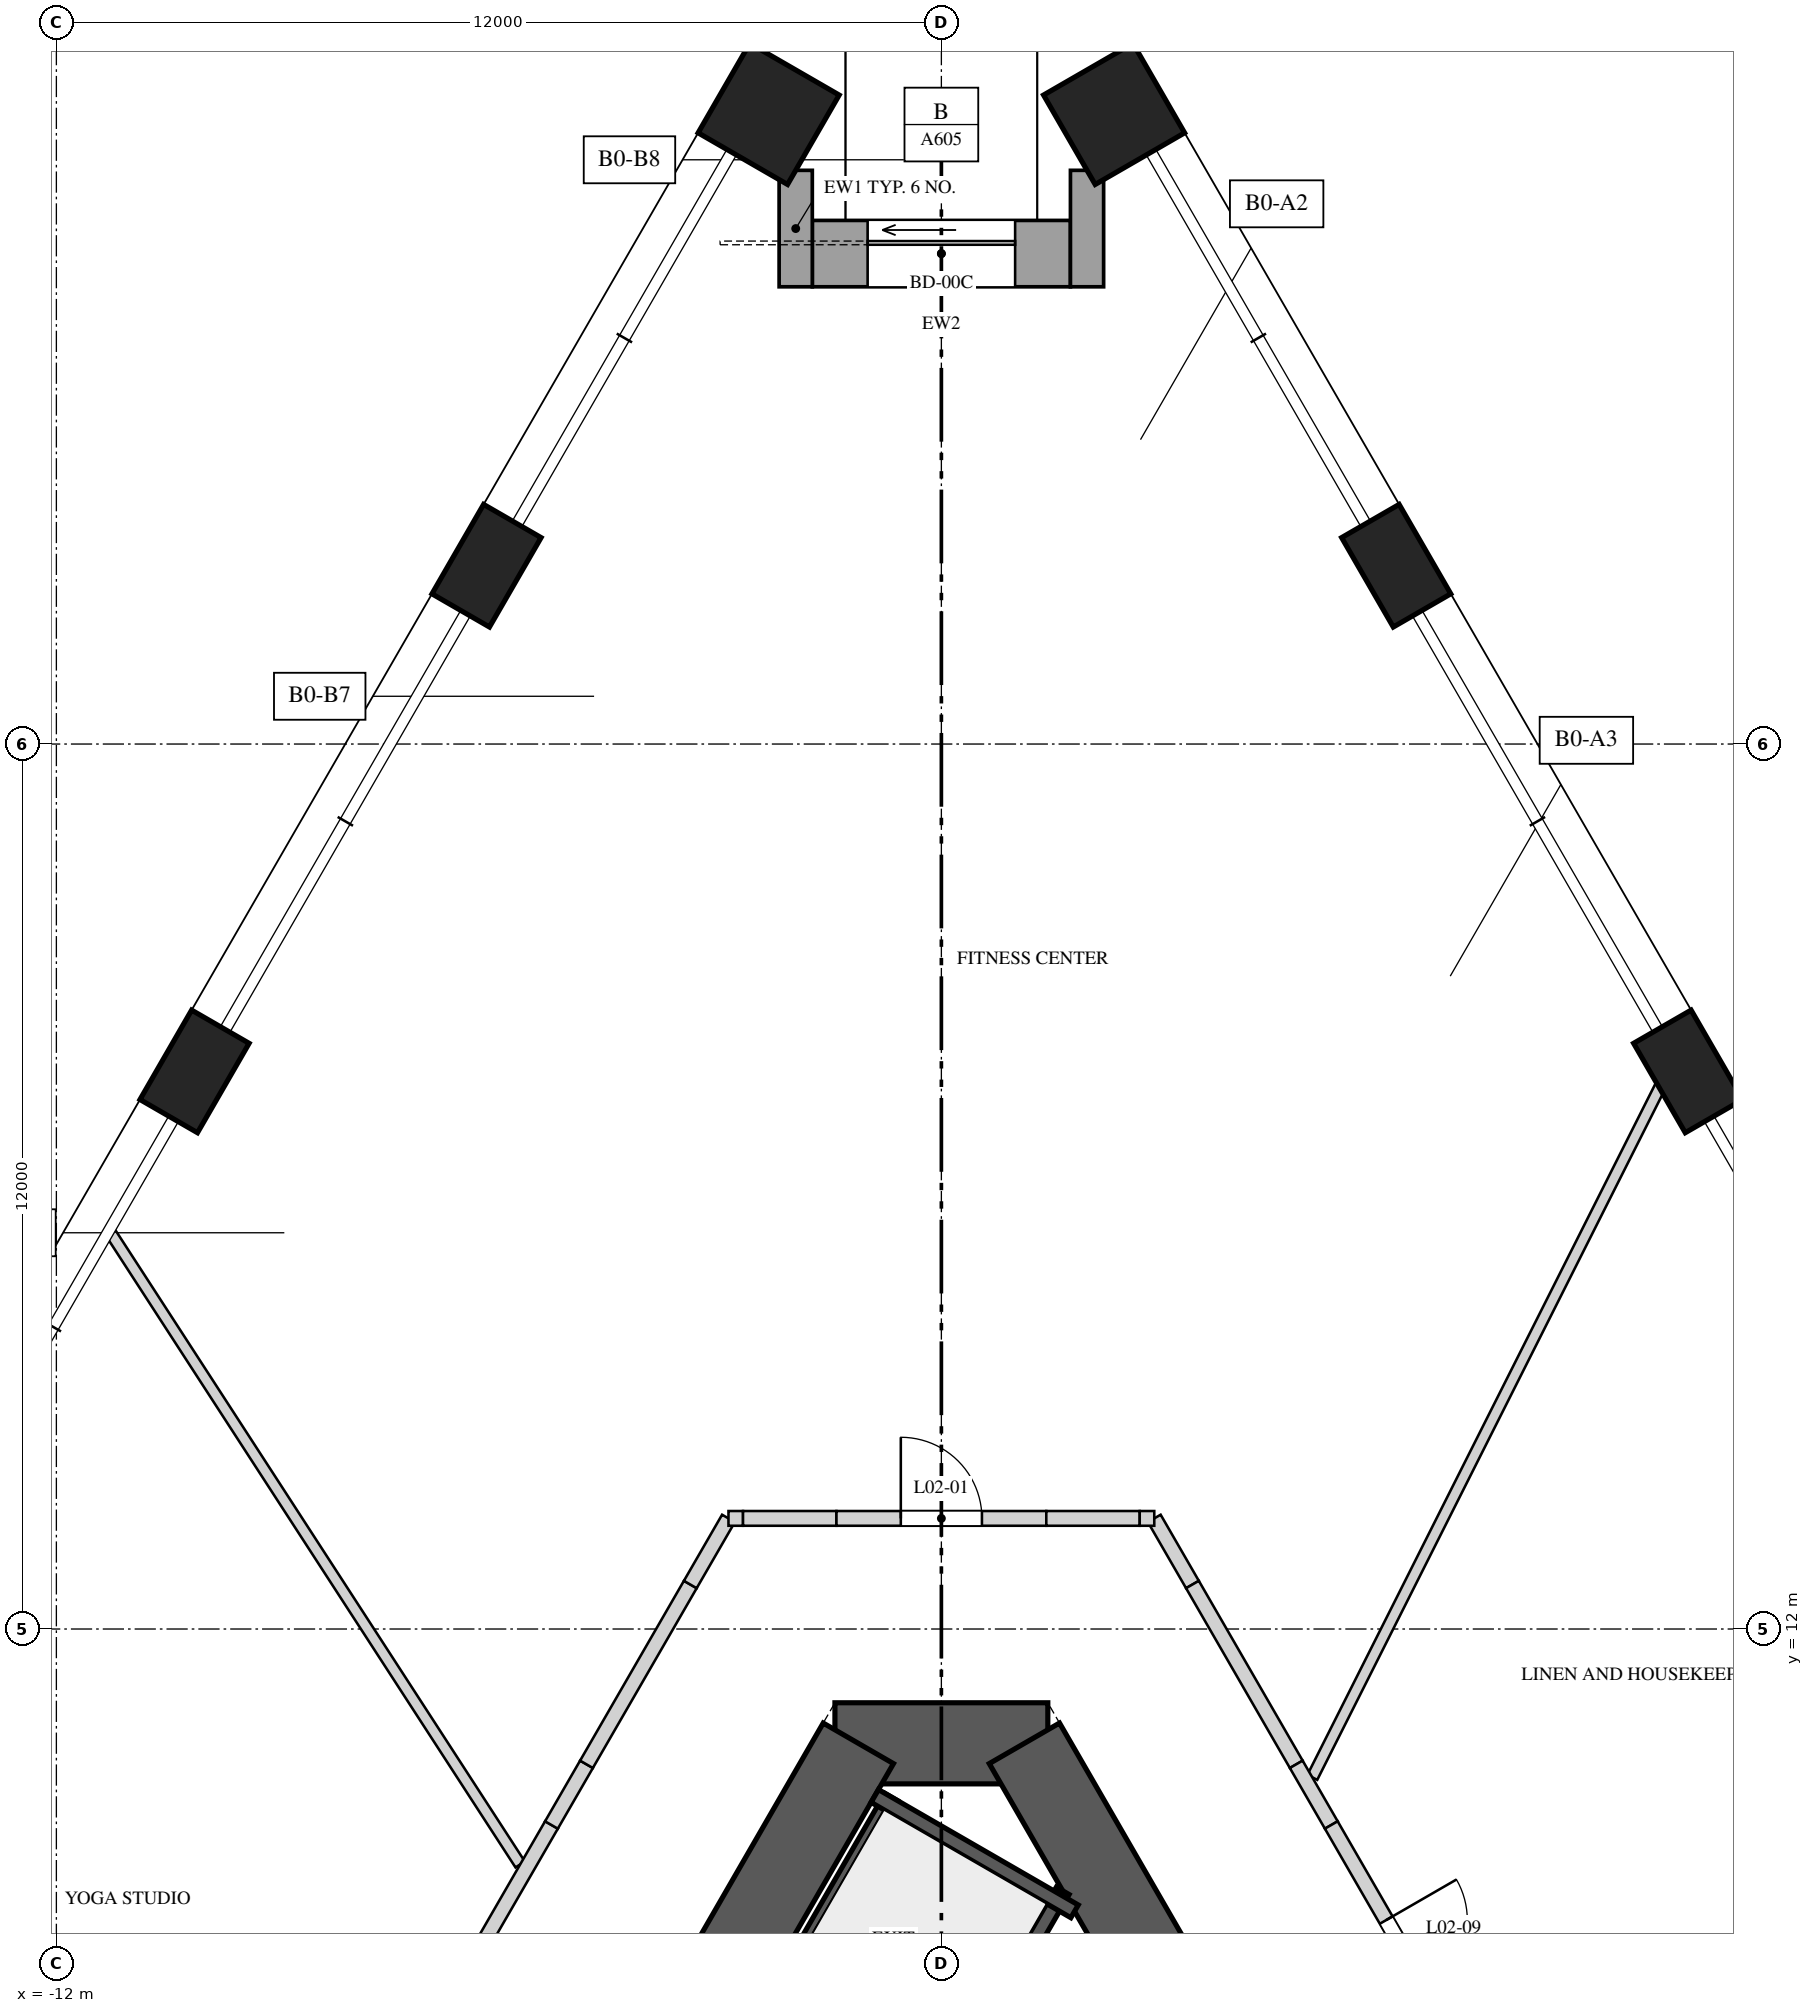
"""IFC4 building model, lengths in metres.
Left out: names, types, materials, properties, quantities, classifications, styles, units other than length and angle.
Written with IfcOpenShell. Run it as: python <this file> out.ifc"""

import sys

from ifc_helpers import new_model, si_unit, direction, frame, frame_2d, origin, origin_2d, place, context, subcontext, project, spatial, polyline, rectangle, outline, extrude, element, fill, save


model = new_model("IFC4")
c1 = context("Model", 3, precision=1e-05, world=origin(), true_north=direction((0.0, 1.0)))
c2 = subcontext(c1, "Body", "Model", "MODEL_VIEW")
j1 = project(units=[si_unit("LENGTHUNIT", "METRE"), si_unit("PLANEANGLEUNIT", "RADIAN")], contexts=[c1])
p1 = place(None, origin())
s1 = spatial("IfcSite", under=j1, at=p1, CompositionType="ELEMENT")
p2 = place(p1, origin())
s2 = spatial("IfcBuilding", under=s1, at=p2, CompositionType="ELEMENT")
p3 = place(p2, frame((0.0, 0.0, 15.0)))
s3 = spatial("IfcBuildingStorey", under=s2, at=p3, CompositionType="ELEMENT", Elevation=15.0)
p4 = place(p3, frame((1.443, 10.45, 0.0), z_axis=(0.0, 0.0, 1.0), x_axis=(-1.0, 0.0, 0.0)))
e1 = element("IfcWall", 1, at=p4, inside=s3, PredefinedType="SHEAR", context=c2, shape_type="SweptSolid", body=[
    extrude(rectangle(XDim=2.887, YDim=1.1, at=frame_2d((1.443, 0.0))), origin(), (0.0, 0.0, 1.0), 5.0),
])
p5 = place(p3, frame((-1.126, 10.45, 0.0), z_axis=(0.0, 0.0, 1.0), x_axis=(-0.500001757713, -0.866024388966, 0.0)))
e2 = element("IfcWall", 2, at=p5, inside=s3, PredefinedType="SHEAR", context=c2, shape_type="SweptSolid", body=[
    extrude(rectangle(XDim=16.974, YDim=1.1, at=frame_2d((8.487, 0.0))), origin(), (0.0, 0.0, 1.0), 5.0),
])
p6 = place(p5, frame((6.692, 0.0, 0.0)))
e3 = element("IfcOpeningElement", 3, at=p6, cuts=e2, PredefinedType="OPENING", context=c2, shape_type="SweptSolid", body=[
    extrude(rectangle(XDim=1.0, YDim=2.4, at=frame_2d((0.5, 1.2))), frame((0.0, 0.56, 0.0), z_axis=(0.0, -1.0, 0.0), x_axis=(1.0, 0.0, 0.0)), (0.0, 0.0, 1.0), 1.12),
])
p7 = place(p5, frame((14.397, 0.0, 0.0)))
e4 = element("IfcOpeningElement", 4, at=p7, cuts=e2, PredefinedType="OPENING", context=c2, shape_type="SweptSolid", body=[
    extrude(rectangle(XDim=0.8, YDim=2.1, at=frame_2d((0.4, 1.05))), frame((0.0, 0.56, 0.0), z_axis=(0.0, -1.0, 0.0), x_axis=(1.0, 0.0, 0.0)), (0.0, 0.0, 1.0), 1.12),
])
p8 = place(p3, frame((9.613, -4.25, 0.0), z_axis=(0.0, 0.0, 1.0), x_axis=(-0.500001757713, 0.866024388966, 0.0)))
e5 = element("IfcWall", 5, at=p8, inside=s3, PredefinedType="SHEAR", context=c2, shape_type="SweptSolid", body=[
    extrude(rectangle(XDim=16.974, YDim=1.1, at=frame_2d((8.487, 0.0))), origin(), (0.0, 0.0, 1.0), 5.0),
])
p9 = place(p8, frame((6.762, 0.0, 0.0)))
e6 = element("IfcOpeningElement", 6, at=p9, cuts=e5, PredefinedType="OPENING", context=c2, shape_type="SweptSolid", body=[
    extrude(rectangle(XDim=1.0, YDim=2.4, at=frame_2d((0.5, 1.2))), frame((0.0, 0.56, 0.0), z_axis=(0.0, -1.0, 0.0), x_axis=(1.0, 0.0, 0.0)), (0.0, 0.0, 1.0), 1.12),
])
p10 = place(p3, frame((-2.342, 32.544, 0.0), z_axis=(0.0, 0.0, 1.0), x_axis=(-0.5, -0.866025403784, 0.0)))
e7 = element("IfcColumn", 7, at=p10, inside=s3, PredefinedType="COLUMN", context=c2, shape_type="SweptSolid", body=[
    extrude(rectangle(XDim=1.4, YDim=1.4, at=origin_2d()), origin(), (0.0, 0.0, 1.0), 5.0),
])
for number, where, z_axis, x_axis in (
    (8, (-6.167, 26.418, 0.0), (0.0, 0.0, 1.0), (-0.5, -0.866, 0.0)),
    (9, (-10.126, 19.561, 0.0), (0.0, 0.0, 1.0), (-0.5, -0.866, 0.0)),
    (10, (10.126, 19.561, 0.0), (0.0, 0.0, 1.0), (-0.5, 0.866, 0.0)),
    (11, (6.167, 26.418, 0.0), (0.0, 0.0, 1.0), (-0.5, 0.866, 0.0)),
):
    element("IfcColumn", number, at=place(p3, frame(where, z_axis=z_axis, x_axis=x_axis)), inside=s3, PredefinedType="COLUMN", context=c2, shape_type="SweptSolid", body=[
        extrude(rectangle(XDim=1.4, YDim=0.9, at=origin_2d()), origin(), (0.0, 0.0, 1.0), 5.0),
    ])
p11 = place(p3, frame((2.342, 32.544, 0.0), z_axis=(0.0, 0.0, 1.0), x_axis=(-0.5, 0.866025403784, 0.0)))
e12 = element("IfcColumn", 12, at=p11, inside=s3, PredefinedType="COLUMN", context=c2, shape_type="SweptSolid", body=[
    extrude(rectangle(XDim=1.4, YDim=1.4, at=origin_2d()), origin(), (0.0, 0.0, 1.0), 5.0),
])
p12 = place(p3, frame((-1.75, 30.65, 0.0), z_axis=(0.0, 0.0, 1.0), x_axis=(1.0, 0.0, 0.0)))
e13 = element("IfcWall", 13, at=p12, inside=s3, PredefinedType="SOLIDWALL", context=c2, shape_type="SweptSolid", body=[
    extrude(rectangle(XDim=3.5, YDim=0.9, at=frame_2d((1.75, 0.0))), origin(), (0.0, 0.0, 1.0), 4.3),
])
p13 = place(p12, frame((0.75, 0.0, 0.0)))
e14 = element("IfcOpeningElement", 14, at=p13, cuts=e13, PredefinedType="OPENING", context=c2, shape_type="SweptSolid", body=[
    extrude(rectangle(XDim=2.0, YDim=2.4, at=frame_2d((1.0, 1.2))), frame((0.0, 0.46, 0.0), z_axis=(0.0, -1.0, 0.0), x_axis=(1.0, 0.0, 0.0)), (0.0, 0.0, 1.0), 0.92),
])
for number, where, z_axis, x_axis in (
    (15, (-1.975, 31.779, 0.0), (0.0, 0.0, 1.0), (0.0, -1.0, 0.0)),
    (16, (1.975, 31.779, 0.0), (0.0, 0.0, 1.0), (0.0, -1.0, 0.0)),
):
    element("IfcWall", number, at=place(p3, frame(where, z_axis=z_axis, x_axis=x_axis)), inside=s3, PredefinedType="SOLIDWALL", context=c2, shape_type="SweptSolid", body=[
        extrude(rectangle(XDim=1.579, YDim=0.45, at=frame_2d((0.79, 0.0))), origin(), (0.0, 0.0, 1.0), 2.55),
    ])
p14 = place(p3, frame((-0.68, 9.722, 0.0), z_axis=(0.0, 0.0, 1.0), x_axis=(-0.49998037582, -0.866036733513, 0.0)))
e17 = element("IfcWall", 17, at=p14, inside=s3, PredefinedType="SOLIDWALL", context=c2, shape_type="SweptSolid", body=[
    extrude(rectangle(XDim=6.2, YDim=0.2, at=frame_2d((3.1, 0.0))), origin(), (0.0, 0.0, 1.0), 4.65),
])
p15 = place(p3, frame((1.646, 8.45, 0.0), z_axis=(0.0, 0.0, 1.0), x_axis=(-0.500006002103, -0.866021938441, 0.0)))
e18 = element("IfcWall", 18, at=p15, inside=s3, PredefinedType="SOLIDWALL", context=c2, shape_type="SweptSolid", body=[
    extrude(rectangle(XDim=6.261, YDim=0.2, at=frame_2d((3.13, 0.0))), origin(), (0.0, 0.0, 1.0), 4.65),
])
p16 = place(p3, frame((1.806, 8.172, 0.0), z_axis=(0.0, 0.0, 1.0), x_axis=(-0.866054327916, 0.499949898588, 0.0)))
e19 = element("IfcWall", 19, at=p16, inside=s3, PredefinedType="SOLIDWALL", context=c2, shape_type="SweptSolid", body=[
    extrude(rectangle(XDim=3.128, YDim=0.2, at=frame_2d((1.564, 0.0))), origin(), (0.0, 0.0, 1.0), 4.65),
])
p17 = place(p3, frame((-5.711, 8.808, 0.0), z_axis=(0.0, 0.0, 1.0), x_axis=(-0.544077203012, 0.839035158478, 0.0)))
e20 = element("IfcWall", 20, at=p17, inside=s3, PredefinedType="PARTITIONING", context=c2, shape_type="SweptSolid", body=[
    extrude(rectangle(XDim=10.194, YDim=0.15, at=frame_2d((5.097, 0.0))), origin(), (0.0, 0.0, 1.0), 4.65),
])
p18 = place(p3, frame((7.757, 5.265, 0.0), z_axis=(0.0, 0.0, 1.0), x_axis=(0.827367178153, 0.561661421601, 0.0)))
e21 = element("IfcWall", 21, at=p18, inside=s3, PredefinedType="PARTITIONING", context=c2, shape_type="SweptSolid", body=[
    extrude(rectangle(XDim=9.104, YDim=0.15, at=frame_2d((4.552, 0.0))), origin(), (0.0, 0.0, 1.0), 4.65),
])
p19 = place(p3, frame((9.914, 19.688, 0.0), z_axis=(0.0, 0.0, 1.0), x_axis=(-0.449738583761, -0.893160235499, 0.0)))
e22 = element("IfcWall", 22, at=p19, inside=s3, PredefinedType="PARTITIONING", context=c2, shape_type="SweptSolid", body=[
    extrude(rectangle(XDim=10.86, YDim=0.15, at=frame_2d((5.43, 0.0))), origin(), (0.0, 0.0, 1.0), 3.75),
])
p20 = place(p3, frame((2.887, 13.5, 0.0), z_axis=(0.0, 0.0, 1.0), x_axis=(0.499994660107, -0.866028486751, 0.0)))
e23 = element("IfcWall", 23, at=p20, inside=s3, PredefinedType="SOLIDWALL", context=c2, shape_type="SweptSolid", body=[
    extrude(rectangle(XDim=1.035, YDim=0.2, at=frame_2d((0.518, 0.0))), origin(), (0.0, 0.0, 1.0), 3.55),
])
p21 = place(p3, frame((3.404, 12.604, 0.0), z_axis=(0.0, 0.0, 1.0), x_axis=(0.500000186108, -0.866025296335, 0.0)))
e24 = element("IfcWall", 24, at=p21, inside=s3, PredefinedType="SOLIDWALL", context=c2, shape_type="SweptSolid", body=[
    extrude(rectangle(XDim=2.815, YDim=0.2, at=frame_2d((1.408, 0.0))), origin(), (0.0, 0.0, 1.0), 4.65),
])
p22 = place(p3, frame((4.812, 10.165, 0.0), z_axis=(0.0, 0.0, 1.0), x_axis=(0.500174821557, -0.865924446982, 0.0)))
e25 = element("IfcWall", 25, at=p22, inside=s3, PredefinedType="SOLIDWALL", context=c2, shape_type="SweptSolid", body=[
    extrude(rectangle(XDim=0.95, YDim=0.2, at=frame_2d((0.475, 0.0))), origin(), (0.0, 0.0, 1.0), 3.75),
])
p23 = place(p3, frame((5.287, 9.343, 0.0), z_axis=(0.0, 0.0, 1.0), x_axis=(0.499952348839, -0.866052913447, 0.0)))
e26 = element("IfcWall", 26, at=p23, inside=s3, PredefinedType="SOLIDWALL", context=c2, shape_type="SweptSolid", body=[
    extrude(rectangle(XDim=3.064, YDim=0.2, at=frame_2d((1.532, 0.0))), origin(), (0.0, 0.0, 1.0), 4.65),
])
p24 = place(p23, frame((1.489, 0.0, 0.0)))
e27 = element("IfcOpeningElement", 27, at=p24, cuts=e26, PredefinedType="OPENING", context=c2, shape_type="SweptSolid", body=[
    extrude(rectangle(XDim=1.1, YDim=2.4, at=frame_2d((0.55, 1.2))), frame((0.0, 0.11, 0.0), z_axis=(0.0, -1.0, 0.0), x_axis=(1.0, 0.0, 0.0)), (0.0, 0.0, 1.0), 0.22),
])
p25 = place(p3, frame((-6.819, 6.689, 0.0), z_axis=(0.0, 0.0, 1.0), x_axis=(0.499952348839, 0.866052913447, 0.0)))
e28 = element("IfcWall", 28, at=p25, inside=s3, PredefinedType="SOLIDWALL", context=c2, shape_type="SweptSolid", body=[
    extrude(rectangle(XDim=3.064, YDim=0.2, at=frame_2d((1.532, 0.0))), origin(), (0.0, 0.0, 1.0), 4.65),
])
p26 = place(p3, frame((-5.287, 9.343, 0.0), z_axis=(0.0, 0.0, 1.0), x_axis=(0.500174821557, 0.865924446982, 0.0)))
e29 = element("IfcWall", 29, at=p26, inside=s3, PredefinedType="SOLIDWALL", context=c2, shape_type="SweptSolid", body=[
    extrude(rectangle(XDim=0.95, YDim=0.2, at=frame_2d((0.475, 0.0))), origin(), (0.0, 0.0, 1.0), 3.75),
])
p27 = place(p3, frame((-4.812, 10.165, 0.0), z_axis=(0.0, 0.0, 1.0), x_axis=(0.500000186108, 0.866025296335, 0.0)))
e30 = element("IfcWall", 30, at=p27, inside=s3, PredefinedType="SOLIDWALL", context=c2, shape_type="SweptSolid", body=[
    extrude(rectangle(XDim=2.815, YDim=0.2, at=frame_2d((1.408, 0.0))), origin(), (0.0, 0.0, 1.0), 4.65),
])
p28 = place(p3, frame((-3.404, 12.604, 0.0), z_axis=(0.0, 0.0, 1.0), x_axis=(0.499994660107, 0.866028486751, 0.0)))
e31 = element("IfcWall", 31, at=p28, inside=s3, PredefinedType="SOLIDWALL", context=c2, shape_type="SweptSolid", body=[
    extrude(rectangle(XDim=1.035, YDim=0.2, at=frame_2d((0.518, 0.0))), origin(), (0.0, 0.0, 1.0), 3.55),
])
p29 = place(p3, frame((-2.887, 13.5, 0.0), z_axis=(0.0, 0.0, 1.0), x_axis=(1.0, 0.0, 0.0)))
e32 = element("IfcWall", 32, at=p29, inside=s3, PredefinedType="SOLIDWALL", context=c2, shape_type="SweptSolid", body=[
    extrude(rectangle(XDim=0.197, YDim=0.2, at=frame_2d((0.099, 0.0))), origin(), (0.0, 0.0, 1.0), 3.55),
])
p30 = place(p3, frame((-2.689, 13.5, 0.0), z_axis=(0.0, 0.0, 1.0), x_axis=(1.0, 0.0, 0.0)))
e33 = element("IfcWall", 33, at=p30, inside=s3, PredefinedType="SOLIDWALL", context=c2, shape_type="SweptSolid", body=[
    extrude(rectangle(XDim=1.267, YDim=0.2, at=frame_2d((0.633, 0.0))), origin(), (0.0, 0.0, 1.0), 4.65),
])
p31 = place(p3, frame((-1.423, 13.5, 0.0), z_axis=(0.0, 0.0, 1.0), x_axis=(1.0, 0.0, 0.0)))
e34 = element("IfcWall", 34, at=p31, inside=s3, PredefinedType="SOLIDWALL", context=c2, shape_type="SweptSolid", body=[
    extrude(outline(polyline([(0.0, 0.0), (2.845, 0.0), (2.845, 3.55), (1.943, 3.55), (1.943, 4.65), (0.902, 4.65), (0.902, 3.55), (0.0, 3.55), (0.0, 0.0)])), frame((0.0, 0.1, 0.0), z_axis=(0.0, -1.0, 0.0), x_axis=(1.0, 0.0, 0.0)), (0.0, 0.0, 1.0), 0.2),
])
p32 = place(p31, frame((0.873, 0.0, 0.0)))
e35 = element("IfcOpeningElement", 35, at=p32, cuts=e34, PredefinedType="OPENING", context=c2, shape_type="SweptSolid", body=[
    extrude(rectangle(XDim=1.1, YDim=2.4, at=frame_2d((0.55, 1.2))), frame((0.0, 0.11, 0.0), z_axis=(0.0, -1.0, 0.0), x_axis=(1.0, 0.0, 0.0)), (0.0, 0.0, 1.0), 0.22),
])
p33 = place(p3, frame((1.423, 13.5, 0.0), z_axis=(0.0, 0.0, 1.0), x_axis=(1.0, 0.0, 0.0)))
e36 = element("IfcWall", 36, at=p33, inside=s3, PredefinedType="SOLIDWALL", context=c2, shape_type="SweptSolid", body=[
    extrude(rectangle(XDim=1.267, YDim=0.2, at=frame_2d((0.633, 0.0))), origin(), (0.0, 0.0, 1.0), 4.65),
])
p34 = place(p3, frame((2.689, 13.5, 0.0), z_axis=(0.0, 0.0, 1.0), x_axis=(1.0, 0.0, 0.0)))
e37 = element("IfcWall", 37, at=p34, inside=s3, PredefinedType="SOLIDWALL", context=c2, shape_type="SweptSolid", body=[
    extrude(rectangle(XDim=0.197, YDim=0.2, at=frame_2d((0.099, 0.0))), origin(), (0.0, 0.0, 1.0), 3.55),
])
p35 = place(p13, origin())
e38 = element("IfcDoor", 38, at=p35, inside=s3, OperationType="SLIDING_TO_LEFT", PredefinedType="DOOR", context=c2, shape_type="SweptSolid", body=[
    extrude(rectangle(XDim=2.0, YDim=2.4, at=frame_2d((1.0, 1.2))), frame((0.0, 0.025, 0.0), z_axis=(0.0, -1.0, 0.0), x_axis=(1.0, 0.0, 0.0)), (0.0, 0.0, 1.0), 0.05),
])
fill(e14, e38)
p36 = place(p32, origin())
e39 = element("IfcDoor", 39, at=p36, inside=s3, OperationType="SINGLE_SWING_LEFT", PredefinedType="DOOR", context=c2, shape_type="SweptSolid", body=[
    extrude(rectangle(XDim=1.1, YDim=2.4, at=frame_2d((0.55, 1.2))), frame((0.0, 0.025, 0.0), z_axis=(0.0, -1.0, 0.0), x_axis=(1.0, 0.0, 0.0)), (0.0, 0.0, 1.0), 0.05),
])
fill(e35, e39)
p37 = place(p24, origin())
e40 = element("IfcDoor", 40, at=p37, inside=s3, OperationType="SINGLE_SWING_LEFT", PredefinedType="DOOR", context=c2, shape_type="SweptSolid", body=[
    extrude(rectangle(XDim=1.1, YDim=2.4, at=frame_2d((0.55, 1.2))), frame((0.0, 0.025, 0.0), z_axis=(0.0, -1.0, 0.0), x_axis=(1.0, 0.0, 0.0)), (0.0, 0.0, 1.0), 0.05),
])
fill(e27, e40)
save(model, sys.argv[1])
